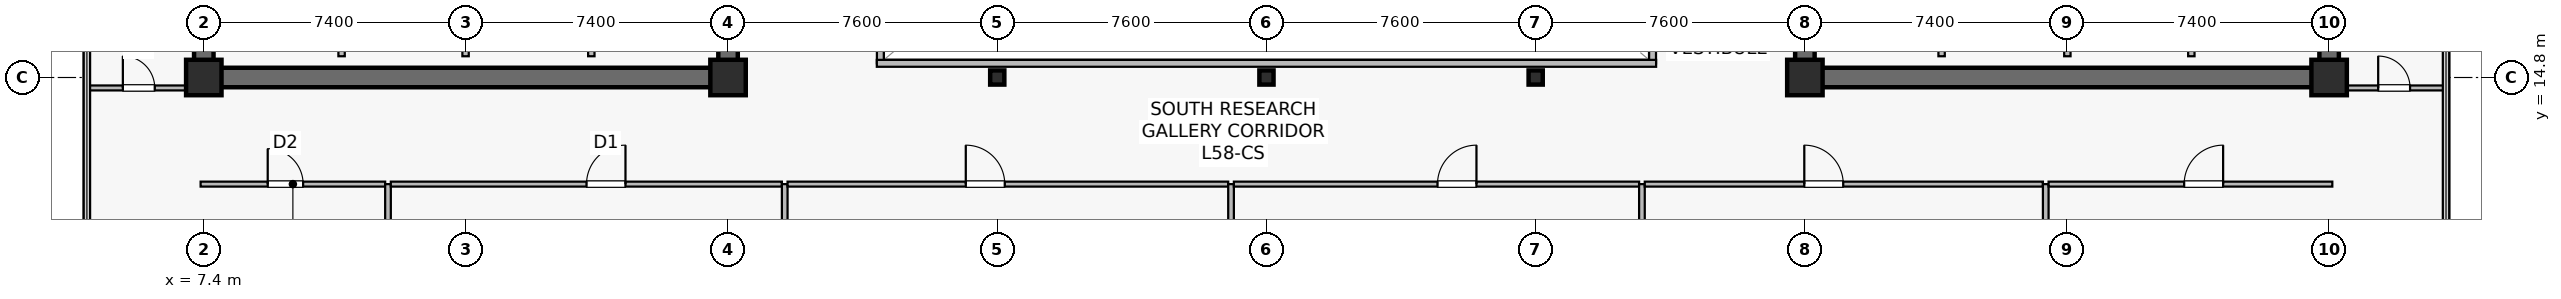
"""IFC4 building model, lengths in metres.
Left out: names, types, materials, properties, quantities, classifications, styles, units other than length and angle.
Written with IfcOpenShell. Run it as: python <this file> out.ifc"""

import sys

from ifc_helpers import new_model, si_unit, direction, frame, frame_2d, origin, origin_2d, place, context, subcontext, project, spatial, rectangle, hollow_rectangle, extrude, source, transform, mapped, element, fill, save


model = new_model("IFC4")
c1 = context("Model", 3, precision=1e-05, world=origin(), true_north=direction((0.0, 1.0)))
c2 = subcontext(c1, "Body", "Model", "MODEL_VIEW")
j1 = project(units=[si_unit("LENGTHUNIT", "METRE"), si_unit("PLANEANGLEUNIT", "RADIAN")], contexts=[c1])
p1 = place(None, origin())
s1 = spatial("IfcSite", under=j1, at=p1, CompositionType="ELEMENT")
p2 = place(p1, origin())
s2 = spatial("IfcBuilding", under=s1, at=p2, CompositionType="ELEMENT")
p3 = place(p2, frame((0.0, 0.0, 242.4)))
s3 = spatial("IfcBuildingStorey", under=s2, at=p3, CompositionType="ELEMENT", Elevation=242.4)
p4 = place(p3, frame((7.125, 14.8, 0.0), z_axis=(0.0, 0.0, 1.0), x_axis=(1.0, 0.0, 0.0)))
e1 = element("IfcWall", 1, at=p4, inside=s3, PredefinedType="SHEAR", context=c2, shape_type="SweptSolid", body=[
    extrude(rectangle(XDim=15.35, YDim=0.55, at=frame_2d((7.675, 0.0))), origin(), (0.0, 0.0, 1.0), 3.8),
])
p5 = place(p3, frame((7.4, 15.075, 0.0), z_axis=(0.0, 0.0, 1.0), x_axis=(0.0, 1.0, 0.0)))
e2 = element("IfcWall", 2, at=p5, inside=s3, PredefinedType="SHEAR", context=c2, shape_type="SweptSolid", body=[
    extrude(rectangle(XDim=18.45, YDim=0.55, at=frame_2d((9.225, 0.0))), origin(), (0.0, 0.0, 1.0), 3.8),
])
p6 = place(p3, frame((22.2, 15.075, 0.0), z_axis=(0.0, 0.0, 1.0), x_axis=(0.0, 1.0, 0.0)))
e3 = element("IfcWall", 3, at=p6, inside=s3, PredefinedType="SHEAR", context=c2, shape_type="SweptSolid", body=[
    extrude(rectangle(XDim=18.45, YDim=0.55, at=frame_2d((9.225, 0.0))), origin(), (0.0, 0.0, 1.0), 3.8),
])
p7 = place(p6, frame((3.475, 0.0, 0.0)))
e4 = element("IfcOpeningElement", 4, at=p7, cuts=e3, PredefinedType="OPENING", context=c2, shape_type="SweptSolid", body=[
    extrude(rectangle(XDim=1.42, YDim=2.2, at=frame_2d((0.71, 1.1))), frame((0.0, 0.285, 0.0), z_axis=(0.0, -1.0, 0.0), x_axis=(1.0, 0.0, 0.0)), (0.0, 0.0, 1.0), 0.57),
])
p8 = place(p3, frame((52.325, 14.8, 0.0), z_axis=(0.0, 0.0, 1.0), x_axis=(1.0, 0.0, 0.0)))
e5 = element("IfcWall", 5, at=p8, inside=s3, PredefinedType="SHEAR", context=c2, shape_type="SweptSolid", body=[
    extrude(rectangle(XDim=15.35, YDim=0.55, at=frame_2d((7.675, 0.0))), origin(), (0.0, 0.0, 1.0), 3.8),
])
p9 = place(p3, frame((52.6, 15.075, 0.0), z_axis=(0.0, 0.0, 1.0), x_axis=(0.0, 1.0, 0.0)))
e6 = element("IfcWall", 6, at=p9, inside=s3, PredefinedType="SHEAR", context=c2, shape_type="SweptSolid", body=[
    extrude(rectangle(XDim=18.45, YDim=0.55, at=frame_2d((9.225, 0.0))), origin(), (0.0, 0.0, 1.0), 3.8),
])
p10 = place(p9, frame((3.475, 0.0, 0.0)))
e7 = element("IfcOpeningElement", 7, at=p10, cuts=e6, PredefinedType="OPENING", context=c2, shape_type="SweptSolid", body=[
    extrude(rectangle(XDim=1.42, YDim=2.2, at=frame_2d((0.71, 1.1))), frame((0.0, 0.285, 0.0), z_axis=(0.0, -1.0, 0.0), x_axis=(1.0, 0.0, 0.0)), (0.0, 0.0, 1.0), 0.57),
])
p11 = place(p3, frame((67.4, 15.075, 0.0), z_axis=(0.0, 0.0, 1.0), x_axis=(0.0, 1.0, 0.0)))
e8 = element("IfcWall", 8, at=p11, inside=s3, PredefinedType="SHEAR", context=c2, shape_type="SweptSolid", body=[
    extrude(rectangle(XDim=18.45, YDim=0.55, at=frame_2d((9.225, 0.0))), origin(), (0.0, 0.0, 1.0), 3.8),
])
m1 = source(origin(), c2, "Body", "SweptSolid", [
    extrude(rectangle(XDim=1.0, YDim=1.0, at=origin_2d()), origin(), (0.0, 0.0, 1.0), 4.1),
])
for number, where, z_axis, x_axis in (
    (9, (7.4, 14.8, 0.0), (0.0, 0.0, 1.0), (1.0, 0.0, 0.0)),
    (10, (22.2, 14.8, 0.0), (0.0, 0.0, 1.0), (1.0, 0.0, 0.0)),
    (11, (52.6, 14.8, 0.0), (0.0, 0.0, 1.0), (1.0, 0.0, 0.0)),
    (12, (67.4, 14.8, 0.0), (0.0, 0.0, 1.0), (1.0, 0.0, 0.0)),
):
    element("IfcColumn", number, at=place(p3, frame(where, z_axis=z_axis, x_axis=x_axis)), inside=s3, PredefinedType="COLUMN", context=c2, shape_type="MappedRepresentation", body=[
        mapped(m1, transform((0.0, 0.0, 0.0), scale=1.0)),
    ])
m2 = source(origin(), c2, "Body", "SweptSolid", [
    extrude(hollow_rectangle(XDim=0.4, YDim=0.4, WallThickness=0.019, at=origin_2d()), origin(), (0.0, 0.0, 1.0), 4.1),
])
for number, where, z_axis, x_axis in (
    (13, (29.8, 14.8, 0.0), (0.0, 0.0, 1.0), (1.0, 0.0, 0.0)),
    (14, (37.4, 14.8, 0.0), (0.0, 0.0, 1.0), (1.0, 0.0, 0.0)),
    (15, (45.0, 14.8, 0.0), (0.0, 0.0, 1.0), (1.0, 0.0, 0.0)),
):
    element("IfcColumn", number, at=place(p3, frame(where, z_axis=z_axis, x_axis=x_axis)), inside=s3, PredefinedType="COLUMN", context=c2, shape_type="MappedRepresentation", body=[
        mapped(m2, transform((0.0, 0.0, 0.0), scale=1.0)),
    ])
p12 = place(p3, frame((11.29, 15.4, 0.0), z_axis=(0.0, 0.0, 1.0), x_axis=(0.0, 1.0, 0.0)))
e16 = element("IfcWall", 16, at=p12, inside=s3, PredefinedType="SOLIDWALL", context=c2, shape_type="SweptSolid", body=[
    extrude(rectangle(XDim=2.4, YDim=0.18, at=frame_2d((1.2, 0.0))), origin(), (0.0, 0.0, 1.0), 3.8),
])
p13 = place(p3, frame((14.79, 15.4, 0.0), z_axis=(0.0, 0.0, 1.0), x_axis=(0.0, 1.0, 0.0)))
e17 = element("IfcWall", 17, at=p13, inside=s3, PredefinedType="SOLIDWALL", context=c2, shape_type="SweptSolid", body=[
    extrude(rectangle(XDim=2.4, YDim=0.18, at=frame_2d((1.2, 0.0))), origin(), (0.0, 0.0, 1.0), 3.197),
])
for number, where, z_axis, x_axis in (
    (18, (18.34, 15.4, 0.0), (0.0, 0.0, 1.0), (0.0, 1.0, 0.0)),
    (19, (63.51, 15.4, 0.0), (0.0, 0.0, 1.0), (0.0, 1.0, 0.0)),
):
    element("IfcWall", number, at=place(p3, frame(where, z_axis=z_axis, x_axis=x_axis)), inside=s3, PredefinedType="SOLIDWALL", context=c2, shape_type="SweptSolid", body=[
        extrude(rectangle(XDim=2.4, YDim=0.18, at=frame_2d((1.2, 0.0))), origin(), (0.0, 0.0, 1.0), 3.8),
    ])
p14 = place(p3, frame((60.01, 15.4, 0.0), z_axis=(0.0, 0.0, 1.0), x_axis=(0.0, 1.0, 0.0)))
e20 = element("IfcWall", 20, at=p14, inside=s3, PredefinedType="SOLIDWALL", context=c2, shape_type="SweptSolid", body=[
    extrude(rectangle(XDim=2.4, YDim=0.18, at=frame_2d((1.2, 0.0))), origin(), (0.0, 0.0, 1.0), 3.197),
])
p15 = place(p3, frame((56.46, 15.4, 0.0), z_axis=(0.0, 0.0, 1.0), x_axis=(0.0, 1.0, 0.0)))
e21 = element("IfcWall", 21, at=p15, inside=s3, PredefinedType="SOLIDWALL", context=c2, shape_type="SweptSolid", body=[
    extrude(rectangle(XDim=2.4, YDim=0.18, at=frame_2d((1.2, 0.0))), origin(), (0.0, 0.0, 1.0), 3.8),
])
p16 = place(p3, frame((26.5, 15.2, 0.0), z_axis=(0.0, 0.0, 1.0), x_axis=(0.0, 1.0, 0.0)))
e22 = element("IfcWall", 22, at=p16, inside=s3, PredefinedType="SOLIDWALL", context=c2, shape_type="SweptSolid", body=[
    extrude(rectangle(XDim=18.2, YDim=0.195, at=frame_2d((9.1, 0.0))), origin(), (0.0, 0.0, 1.0), 3.8),
])
p17 = place(p16, frame((1.8, 0.0, 0.9)))
e23 = element("IfcOpeningElement", 23, at=p17, cuts=e22, PredefinedType="OPENING", context=c2, shape_type="SweptSolid", body=[
    extrude(rectangle(XDim=1.5, YDim=1.4, at=frame_2d((0.75, 0.7))), frame((0.0, 0.107, 0.0), z_axis=(0.0, -1.0, 0.0), x_axis=(1.0, 0.0, 0.0)), (0.0, 0.0, 1.0), 0.215),
])
p18 = place(p16, frame((13.2, 0.0, 0.9)))
e24 = element("IfcOpeningElement", 24, at=p18, cuts=e22, PredefinedType="OPENING", context=c2, shape_type="SweptSolid", body=[
    extrude(rectangle(XDim=1.5, YDim=1.4, at=frame_2d((0.75, 0.7))), frame((0.0, 0.107, 0.0), z_axis=(0.0, -1.0, 0.0), x_axis=(1.0, 0.0, 0.0)), (0.0, 0.0, 1.0), 0.215),
])
p19 = place(p3, frame((48.3, 15.2, 0.0), z_axis=(0.0, 0.0, 1.0), x_axis=(0.0, 1.0, 0.0)))
e25 = element("IfcWall", 25, at=p19, inside=s3, PredefinedType="SOLIDWALL", context=c2, shape_type="SweptSolid", body=[
    extrude(rectangle(XDim=18.2, YDim=0.195, at=frame_2d((9.1, 0.0))), origin(), (0.0, 0.0, 1.0), 3.8),
])
p20 = place(p19, frame((1.8, 0.0, 0.9)))
e26 = element("IfcOpeningElement", 26, at=p20, cuts=e25, PredefinedType="OPENING", context=c2, shape_type="SweptSolid", body=[
    extrude(rectangle(XDim=1.5, YDim=1.4, at=frame_2d((0.75, 0.7))), frame((0.0, 0.107, 0.0), z_axis=(0.0, -1.0, 0.0), x_axis=(1.0, 0.0, 0.0)), (0.0, 0.0, 1.0), 0.215),
])
p21 = place(p19, frame((13.2, 0.0, 0.9)))
e27 = element("IfcOpeningElement", 27, at=p21, cuts=e25, PredefinedType="OPENING", context=c2, shape_type="SweptSolid", body=[
    extrude(rectangle(XDim=1.5, YDim=1.4, at=frame_2d((0.75, 0.7))), frame((0.0, 0.107, 0.0), z_axis=(0.0, -1.0, 0.0), x_axis=(1.0, 0.0, 0.0)), (0.0, 0.0, 1.0), 0.215),
])
p22 = place(p3, frame((26.4, 15.2, 0.0), z_axis=(0.0, 0.0, 1.0), x_axis=(1.0, 0.0, 0.0)))
e28 = element("IfcWall", 28, at=p22, inside=s3, PredefinedType="SOLIDWALL", context=c2, shape_type="SweptSolid", body=[
    extrude(rectangle(XDim=22.0, YDim=0.195, at=frame_2d((11.0, 0.0))), origin(), (0.0, 0.0, 1.0), 3.8),
])
p23 = place(p3, frame((7.31, 11.79, 0.0), z_axis=(0.0, 0.0, 1.0), x_axis=(1.0, 0.0, 0.0)))
e29 = element("IfcWall", 29, at=p23, inside=s3, PredefinedType="PARTITIONING", context=c2, shape_type="SweptSolid", body=[
    extrude(rectangle(XDim=5.21, YDim=0.14, at=frame_2d((2.605, 0.0))), origin(), (0.0, 0.0, 1.0), 3.335),
])
p24 = place(p23, frame((1.894, 0.0, 0.0)))
e30 = element("IfcOpeningElement", 30, at=p24, cuts=e29, PredefinedType="OPENING", context=c2, shape_type="SweptSolid", body=[
    extrude(rectangle(XDim=1.0, YDim=2.15, at=frame_2d((0.5, 1.075))), frame((0.0, 0.08, 0.0), z_axis=(0.0, -1.0, 0.0), x_axis=(1.0, 0.0, 0.0)), (0.0, 0.0, 1.0), 0.16),
])
p25 = place(p3, frame((12.6, 2.71, 0.0), z_axis=(0.0, 0.0, 1.0), x_axis=(0.0, 1.0, 0.0)))
e31 = element("IfcWall", 31, at=p25, inside=s3, PredefinedType="PARTITIONING", context=c2, shape_type="SweptSolid", body=[
    extrude(rectangle(XDim=9.08, YDim=0.16, at=frame_2d((4.54, 0.0))), origin(), (0.0, 0.0, 1.0), 3.135),
])
p26 = place(p3, frame((12.68, 11.79, 0.0), z_axis=(0.0, 0.0, 1.0), x_axis=(1.0, 0.0, 0.0)))
e32 = element("IfcWall", 32, at=p26, inside=s3, PredefinedType="PARTITIONING", context=c2, shape_type="SweptSolid", body=[
    extrude(rectangle(XDim=11.04, YDim=0.14, at=frame_2d((5.52, 0.0))), origin(), (0.0, 0.0, 1.0), 3.197),
])
p27 = place(p26, frame((5.524, 0.0, 0.0)))
e33 = element("IfcOpeningElement", 33, at=p27, cuts=e32, PredefinedType="OPENING", context=c2, shape_type="SweptSolid", body=[
    extrude(rectangle(XDim=1.1, YDim=2.18, at=frame_2d((0.55, 1.09))), frame((0.0, 0.08, 0.0), z_axis=(0.0, -1.0, 0.0), x_axis=(1.0, 0.0, 0.0)), (0.0, 0.0, 1.0), 0.16),
])
p28 = place(p3, frame((23.8, 2.71, 0.0), z_axis=(0.0, 0.0, 1.0), x_axis=(0.0, 1.0, 0.0)))
e34 = element("IfcWall", 34, at=p28, inside=s3, PredefinedType="PARTITIONING", context=c2, shape_type="SweptSolid", body=[
    extrude(rectangle(XDim=9.08, YDim=0.16, at=frame_2d((4.54, 0.0))), origin(), (0.0, 0.0, 1.0), 3.135),
])
p29 = place(p3, frame((23.88, 11.79, 0.0), z_axis=(0.0, 0.0, 1.0), x_axis=(1.0, 0.0, 0.0)))
e35 = element("IfcWall", 35, at=p29, inside=s3, PredefinedType="PARTITIONING", context=c2, shape_type="SweptSolid", body=[
    extrude(rectangle(XDim=12.44, YDim=0.14, at=frame_2d((6.22, 0.0))), origin(), (0.0, 0.0, 1.0), 3.197),
])
p30 = place(p29, frame((5.031, 0.0, 0.0)))
e36 = element("IfcOpeningElement", 36, at=p30, cuts=e35, PredefinedType="OPENING", context=c2, shape_type="SweptSolid", body=[
    extrude(rectangle(XDim=1.1, YDim=2.18, at=frame_2d((0.55, 1.09))), frame((0.0, 0.08, 0.0), z_axis=(0.0, -1.0, 0.0), x_axis=(1.0, 0.0, 0.0)), (0.0, 0.0, 1.0), 0.16),
])
p31 = place(p3, frame((36.4, 3.91, 0.0), z_axis=(0.0, 0.0, 1.0), x_axis=(0.0, 1.0, 0.0)))
e37 = element("IfcWall", 37, at=p31, inside=s3, PredefinedType="PARTITIONING", context=c2, shape_type="SweptSolid", body=[
    extrude(rectangle(XDim=7.88, YDim=0.16, at=frame_2d((3.94, 0.0))), origin(), (0.0, 0.0, 1.0), 3.135),
])
p32 = place(p3, frame((36.48, 11.79, 0.0), z_axis=(0.0, 0.0, 1.0), x_axis=(1.0, 0.0, 0.0)))
e38 = element("IfcWall", 38, at=p32, inside=s3, PredefinedType="PARTITIONING", context=c2, shape_type="SweptSolid", body=[
    extrude(rectangle(XDim=11.44, YDim=0.14, at=frame_2d((5.72, 0.0))), origin(), (0.0, 0.0, 1.0), 3.197),
])
p33 = place(p32, frame((5.748, 0.0, 0.0)))
e39 = element("IfcOpeningElement", 39, at=p33, cuts=e38, PredefinedType="OPENING", context=c2, shape_type="SweptSolid", body=[
    extrude(rectangle(XDim=1.1, YDim=2.18, at=frame_2d((0.55, 1.09))), frame((0.0, 0.08, 0.0), z_axis=(0.0, -1.0, 0.0), x_axis=(1.0, 0.0, 0.0)), (0.0, 0.0, 1.0), 0.16),
])
p34 = place(p3, frame((48.0, 3.91, 0.0), z_axis=(0.0, 0.0, 1.0), x_axis=(0.0, 1.0, 0.0)))
e40 = element("IfcWall", 40, at=p34, inside=s3, PredefinedType="PARTITIONING", context=c2, shape_type="SweptSolid", body=[
    extrude(rectangle(XDim=7.88, YDim=0.16, at=frame_2d((3.94, 0.0))), origin(), (0.0, 0.0, 1.0), 3.135),
])
p35 = place(p3, frame((48.08, 11.79, 0.0), z_axis=(0.0, 0.0, 1.0), x_axis=(1.0, 0.0, 0.0)))
e41 = element("IfcWall", 41, at=p35, inside=s3, PredefinedType="PARTITIONING", context=c2, shape_type="SweptSolid", body=[
    extrude(rectangle(XDim=11.24, YDim=0.14, at=frame_2d((5.62, 0.0))), origin(), (0.0, 0.0, 1.0), 3.197),
])
p36 = place(p35, frame((4.504, 0.0, 0.0)))
e42 = element("IfcOpeningElement", 42, at=p36, cuts=e41, PredefinedType="OPENING", context=c2, shape_type="SweptSolid", body=[
    extrude(rectangle(XDim=1.1, YDim=2.18, at=frame_2d((0.55, 1.09))), frame((0.0, 0.08, 0.0), z_axis=(0.0, -1.0, 0.0), x_axis=(1.0, 0.0, 0.0)), (0.0, 0.0, 1.0), 0.16),
])
p37 = place(p3, frame((59.4, 2.71, 0.0), z_axis=(0.0, 0.0, 1.0), x_axis=(0.0, 1.0, 0.0)))
e43 = element("IfcWall", 43, at=p37, inside=s3, PredefinedType="PARTITIONING", context=c2, shape_type="SweptSolid", body=[
    extrude(rectangle(XDim=9.08, YDim=0.16, at=frame_2d((4.54, 0.0))), origin(), (0.0, 0.0, 1.0), 3.135),
])
p38 = place(p3, frame((59.48, 11.79, 0.0), z_axis=(0.0, 0.0, 1.0), x_axis=(1.0, 0.0, 0.0)))
e44 = element("IfcWall", 44, at=p38, inside=s3, PredefinedType="PARTITIONING", context=c2, shape_type="SweptSolid", body=[
    extrude(rectangle(XDim=8.01, YDim=0.14, at=frame_2d((4.005, 0.0))), origin(), (0.0, 0.0, 1.0), 3.197),
])
p39 = place(p38, frame((3.828, 0.0, 0.0)))
e45 = element("IfcOpeningElement", 45, at=p39, cuts=e44, PredefinedType="OPENING", context=c2, shape_type="SweptSolid", body=[
    extrude(rectangle(XDim=1.1, YDim=2.18, at=frame_2d((0.55, 1.09))), frame((0.0, 0.08, 0.0), z_axis=(0.0, -1.0, 0.0), x_axis=(1.0, 0.0, 0.0)), (0.0, 0.0, 1.0), 0.16),
])
p40 = place(p3, frame((4.11, 14.505, 0.0), z_axis=(0.0, 0.0, 1.0), x_axis=(1.0, 0.0, 0.0)))
e46 = element("IfcWall", 46, at=p40, inside=s3, PredefinedType="PARTITIONING", context=c2, shape_type="SweptSolid", body=[
    extrude(rectangle(XDim=2.91, YDim=0.14, at=frame_2d((1.455, 0.0))), origin(), (0.0, 0.0, 1.0), 3.8),
])
p41 = place(p40, frame((1.005, 0.0, 0.0)))
e47 = element("IfcOpeningElement", 47, at=p41, cuts=e46, PredefinedType="OPENING", context=c2, shape_type="SweptSolid", body=[
    extrude(rectangle(XDim=0.9, YDim=2.1, at=frame_2d((0.45, 1.05))), frame((0.0, 0.08, 0.0), z_axis=(0.0, -1.0, 0.0), x_axis=(1.0, 0.0, 0.0)), (0.0, 0.0, 1.0), 0.16),
])
p42 = place(p3, frame((67.78, 14.505, 0.0), z_axis=(0.0, 0.0, 1.0), x_axis=(1.0, 0.0, 0.0)))
e48 = element("IfcWall", 48, at=p42, inside=s3, PredefinedType="PARTITIONING", context=c2, shape_type="SweptSolid", body=[
    extrude(rectangle(XDim=2.91, YDim=0.14, at=frame_2d((1.455, 0.0))), origin(), (0.0, 0.0, 1.0), 3.8),
])
p43 = place(p42, frame((1.005, 0.0, 0.0)))
e49 = element("IfcOpeningElement", 49, at=p43, cuts=e48, PredefinedType="OPENING", context=c2, shape_type="SweptSolid", body=[
    extrude(rectangle(XDim=0.9, YDim=2.1, at=frame_2d((0.45, 1.05))), frame((0.0, 0.08, 0.0), z_axis=(0.0, -1.0, 0.0), x_axis=(1.0, 0.0, 0.0)), (0.0, 0.0, 1.0), 0.16),
])
m3 = source(origin(), c2, "Body", "SweptSolid", [
    extrude(rectangle(XDim=1.0, YDim=2.15, at=frame_2d((0.5, 1.075))), frame((0.0, 0.025, 0.0), z_axis=(0.0, -1.0, 0.0), x_axis=(1.0, 0.0, 0.0)), (0.0, 0.0, 1.0), 0.05),
])
p44 = place(p24, origin())
e50 = element("IfcDoor", 50, at=p44, inside=s3, OperationType="SINGLE_SWING_LEFT", PredefinedType="DOOR", context=c2, shape_type="MappedRepresentation", body=[
    mapped(m3, transform((0.0, 0.0, 0.0), scale=1.0)),
])
fill(e30, e50)
m4 = source(origin(), c2, "Body", "SweptSolid", [
    extrude(rectangle(XDim=1.1, YDim=2.18, at=frame_2d((0.55, 1.09))), frame((0.0, 0.025, 0.0), z_axis=(0.0, -1.0, 0.0), x_axis=(1.0, 0.0, 0.0)), (0.0, 0.0, 1.0), 0.05),
])
p45 = place(p27, origin())
e51 = element("IfcDoor", 51, at=p45, inside=s3, OperationType="SINGLE_SWING_RIGHT", PredefinedType="DOOR", context=c2, shape_type="MappedRepresentation", body=[
    mapped(m4, transform((0.0, 0.0, 0.0), scale=1.0)),
])
fill(e33, e51)
p46 = place(p30, origin())
e52 = element("IfcDoor", 52, at=p46, inside=s3, OperationType="SINGLE_SWING_LEFT", PredefinedType="DOOR", context=c2, shape_type="MappedRepresentation", body=[
    mapped(m4, transform((0.0, 0.0, 0.0), scale=1.0)),
])
fill(e36, e52)
p47 = place(p33, origin())
e53 = element("IfcDoor", 53, at=p47, inside=s3, OperationType="SINGLE_SWING_RIGHT", PredefinedType="DOOR", context=c2, shape_type="MappedRepresentation", body=[
    mapped(m4, transform((0.0, 0.0, 0.0), scale=1.0)),
])
fill(e39, e53)
p48 = place(p36, origin())
e54 = element("IfcDoor", 54, at=p48, inside=s3, OperationType="SINGLE_SWING_LEFT", PredefinedType="DOOR", context=c2, shape_type="MappedRepresentation", body=[
    mapped(m4, transform((0.0, 0.0, 0.0), scale=1.0)),
])
fill(e42, e54)
p49 = place(p39, origin())
e55 = element("IfcDoor", 55, at=p49, inside=s3, OperationType="SINGLE_SWING_RIGHT", PredefinedType="DOOR", context=c2, shape_type="MappedRepresentation", body=[
    mapped(m4, transform((0.0, 0.0, 0.0), scale=1.0)),
])
fill(e45, e55)
m5 = source(origin(), c2, "Body", "SweptSolid", [
    extrude(rectangle(XDim=0.9, YDim=2.1, at=frame_2d((0.45, 1.05))), frame((0.0, 0.025, 0.0), z_axis=(0.0, -1.0, 0.0), x_axis=(1.0, 0.0, 0.0)), (0.0, 0.0, 1.0), 0.05),
])
p50 = place(p41, origin())
e56 = element("IfcDoor", 56, at=p50, inside=s3, OperationType="SINGLE_SWING_LEFT", PredefinedType="DOOR", context=c2, shape_type="MappedRepresentation", body=[
    mapped(m5, transform((0.0, 0.0, 0.0), scale=1.0)),
])
fill(e47, e56)
p51 = place(p43, origin())
e57 = element("IfcDoor", 57, at=p51, inside=s3, OperationType="SINGLE_SWING_LEFT", PredefinedType="DOOR", context=c2, shape_type="MappedRepresentation", body=[
    mapped(m5, transform((0.0, 0.0, 0.0), scale=1.0)),
])
fill(e49, e57)
save(model, sys.argv[1])
